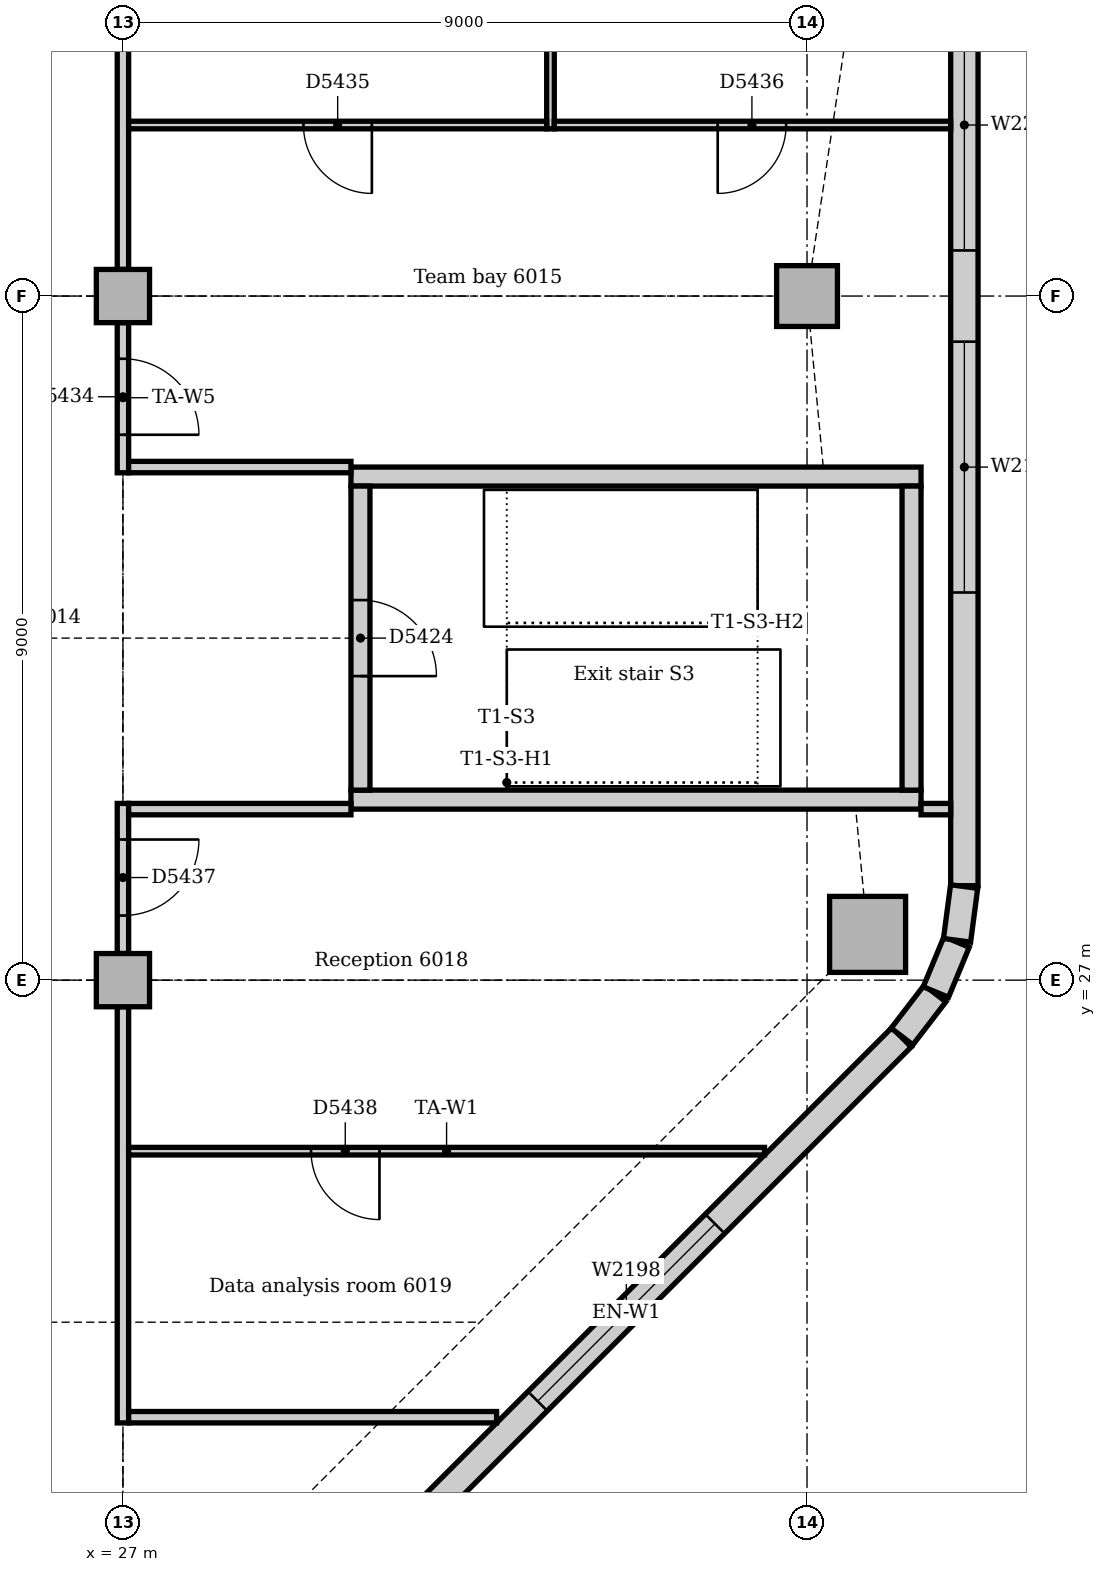
"""IFC4 building model, lengths in metres.
Left out: names, types, materials, properties, quantities, classifications, styles, units other than length and angle.
Written with IfcOpenShell. Run it as: python <this file> out.ifc"""

import sys

from ifc_helpers import new_model, si_unit, direction, frame, frame_2d, origin, origin_2d, place, context, subcontext, project, spatial, rectangle, extrude, element, fill, save


model = new_model("IFC4")
c1 = context("Model", 3, precision=1e-05, world=origin(), true_north=direction((0.0, 1.0)))
c2 = subcontext(c1, "Body", "Model", "MODEL_VIEW")
j1 = project(units=[si_unit("LENGTHUNIT", "METRE"), si_unit("PLANEANGLEUNIT", "RADIAN")], contexts=[c1])
p1 = place(None, origin())
s1 = spatial("IfcSite", under=j1, at=p1, CompositionType="ELEMENT")
p2 = place(p1, origin())
s2 = spatial("IfcBuilding", under=s1, at=p2, CompositionType="ELEMENT")
p3 = place(p2, frame((0.0, 0.0, 251.0)))
s3 = spatial("IfcBuildingStorey", under=s2, at=p3, CompositionType="ELEMENT", Elevation=251.0)
for number, where, z_axis, x_axis in (
    (1, (30.0, 29.375, 0.0), (0.0, 0.0, 1.0), (1.0, 0.0, 0.0)),
    (2, (37.5, 33.625, 0.0), (0.0, 0.0, 1.0), (-1.0, 0.0, 0.0)),
):
    element("IfcWall", number, at=place(p3, frame(where, z_axis=z_axis, x_axis=x_axis)), inside=s3, PredefinedType="SOLIDWALL", context=c2, shape_type="SweptSolid", body=[
        extrude(rectangle(XDim=7.5, YDim=0.25, at=frame_2d((3.75, 0.0))), origin(), (0.0, 0.0, 1.0), 4.0),
    ])
p4 = place(p3, frame((37.375, 29.5, 0.0), z_axis=(0.0, 0.0, 1.0), x_axis=(0.0, 1.0, 0.0)))
e3 = element("IfcWall", 3, at=p4, inside=s3, PredefinedType="SOLIDWALL", context=c2, shape_type="SweptSolid", body=[
    extrude(rectangle(XDim=4.0, YDim=0.25, at=frame_2d((2.0, 0.0))), origin(), (0.0, 0.0, 1.0), 4.0),
])
p5 = place(p3, frame((30.125, 33.5, 0.0), z_axis=(0.0, 0.0, 1.0), x_axis=(0.0, -1.0, 0.0)))
e4 = element("IfcWall", 4, at=p5, inside=s3, PredefinedType="SOLIDWALL", context=c2, shape_type="SweptSolid", body=[
    extrude(rectangle(XDim=4.0, YDim=0.25, at=frame_2d((2.0, 0.0))), origin(), (0.0, 0.0, 1.0), 4.0),
])
p6 = place(p5, frame((1.5, 0.0, 0.0)))
e5 = element("IfcOpeningElement", 5, at=p6, cuts=e4, PredefinedType="OPENING", context=c2, shape_type="SweptSolid", body=[
    extrude(rectangle(XDim=1.0, YDim=2.1, at=frame_2d((0.5, 1.05))), frame((0.0, 0.135, 0.0), z_axis=(0.0, -1.0, 0.0), x_axis=(1.0, 0.0, 0.0)), (0.0, 0.0, 1.0), 0.27),
])
p7 = place(p3, frame((36.797, 27.602, 0.0), z_axis=(0.0, 0.0, 1.0), x_axis=(1.0, 0.0, 0.0)))
e6 = element("IfcColumn", 6, at=p7, inside=s3, PredefinedType="COLUMN", context=c2, shape_type="SweptSolid", body=[
    extrude(rectangle(XDim=1.0, YDim=1.0, at=origin_2d()), origin(), (0.0, 0.0, 1.0), 3.85),
])
p8 = place(p3, frame((36.0, 36.0, 0.0), z_axis=(0.0, 0.0, 1.0), x_axis=(1.0, 0.0, 0.0)))
e7 = element("IfcColumn", 7, at=p8, inside=s3, PredefinedType="COLUMN", context=c2, shape_type="SweptSolid", body=[
    extrude(rectangle(XDim=0.8, YDim=0.8, at=origin_2d()), origin(), (0.0, 0.0, 1.0), 3.85),
])
for number, where, z_axis, x_axis in (
    (8, (27.0, 27.0, 0.0), (0.0, 0.0, 1.0), (1.0, 0.0, 0.0)),
    (9, (27.0, 36.0, 0.0), (0.0, 0.0, 1.0), (1.0, 0.0, 0.0)),
):
    element("IfcColumn", number, at=place(p3, frame(where, z_axis=z_axis, x_axis=x_axis)), inside=s3, PredefinedType="COLUMN", context=c2, shape_type="SweptSolid", body=[
        extrude(rectangle(XDim=0.7, YDim=0.7, at=origin_2d()), origin(), (0.0, 0.0, 1.0), 3.85),
    ])
p9 = place(p3, frame((30.001, 19.006, 0.0), z_axis=(0.0, 0.0, 1.0), x_axis=(0.707106781187, 0.707106781187, 0.0)))
e10 = element("IfcWall", 10, at=p9, inside=s3, PredefinedType="STANDARD", context=c2, shape_type="SweptSolid", body=[
    extrude(rectangle(XDim=10.243, YDim=0.36, at=frame_2d((5.121, 0.0))), origin(), (0.0, 0.0, 1.0), 3.85),
])
p10 = place(p9, frame((3.471, 0.0, 0.9)))
e11 = element("IfcOpeningElement", 11, at=p10, cuts=e10, PredefinedType="OPENING", context=c2, shape_type="SweptSolid", body=[
    extrude(rectangle(XDim=3.3, YDim=1.6, at=frame_2d((1.65, 0.8))), frame((0.0, 0.19, 0.0), z_axis=(0.0, -1.0, 0.0), x_axis=(1.0, 0.0, 0.0)), (0.0, 0.0, 1.0), 0.38),
])
p11 = place(p3, frame((38.07, 28.243, 0.0), z_axis=(0.0, 0.0, 1.0), x_axis=(0.0, 1.0, 0.0)))
e12 = element("IfcWall", 12, at=p11, inside=s3, PredefinedType="STANDARD", context=c2, shape_type="SweptSolid", body=[
    extrude(rectangle(XDim=24.515, YDim=0.36, at=frame_2d((12.257, 0.0))), origin(), (0.0, 0.0, 1.0), 3.85),
])
p12 = place(p11, frame((3.857, 0.0, 0.9)))
e13 = element("IfcOpeningElement", 13, at=p12, cuts=e12, PredefinedType="OPENING", context=c2, shape_type="SweptSolid", body=[
    extrude(rectangle(XDim=3.3, YDim=1.6, at=frame_2d((1.65, 0.8))), frame((0.0, 0.19, 0.0), z_axis=(0.0, -1.0, 0.0), x_axis=(1.0, 0.0, 0.0)), (0.0, 0.0, 1.0), 0.38),
])
p13 = place(p11, frame((8.357, 0.0, 0.9)))
e14 = element("IfcOpeningElement", 14, at=p13, cuts=e12, PredefinedType="OPENING", context=c2, shape_type="SweptSolid", body=[
    extrude(rectangle(XDim=3.3, YDim=1.6, at=frame_2d((1.65, 0.8))), frame((0.0, 0.19, 0.0), z_axis=(0.0, -1.0, 0.0), x_axis=(1.0, 0.0, 0.0)), (0.0, 0.0, 1.0), 0.38),
])
p14 = place(p11, frame((12.857, 0.0, 0.9)))
e15 = element("IfcOpeningElement", 15, at=p14, cuts=e12, PredefinedType="OPENING", context=c2, shape_type="SweptSolid", body=[
    extrude(rectangle(XDim=3.3, YDim=1.6, at=frame_2d((1.65, 0.8))), frame((0.0, 0.19, 0.0), z_axis=(0.0, -1.0, 0.0), x_axis=(1.0, 0.0, 0.0)), (0.0, 0.0, 1.0), 0.38),
])
p15 = place(p11, frame((17.357, 0.0, 0.9)))
e16 = element("IfcOpeningElement", 16, at=p15, cuts=e12, PredefinedType="OPENING", context=c2, shape_type="SweptSolid", body=[
    extrude(rectangle(XDim=3.3, YDim=1.6, at=frame_2d((1.65, 0.8))), frame((0.0, 0.19, 0.0), z_axis=(0.0, -1.0, 0.0), x_axis=(1.0, 0.0, 0.0)), (0.0, 0.0, 1.0), 0.38),
])
p16 = place(p3, frame((37.25, 26.259, 0.0), z_axis=(0.0, 0.0, 1.0), x_axis=(0.608802368033, 0.793321924995, 0.0)))
e17 = element("IfcWall", 17, at=p16, inside=s3, PredefinedType="STANDARD", context=c2, shape_type="SweptSolid", body=[
    extrude(rectangle(XDim=0.713, YDim=0.36, at=frame_2d((0.357, 0.0))), origin(), (0.0, 0.0, 1.0), 3.85),
])
for number, where, z_axis, x_axis in (
    (18, (37.695, 26.844, 0.0), (0.0, 0.0, 1.0), (0.383, 0.924, 0.0)),
    (19, (37.974, 27.524, 0.0), (0.0, 0.0, 1.0), (0.131, 0.991, 0.0)),
):
    element("IfcWall", number, at=place(p3, frame(where, z_axis=z_axis, x_axis=x_axis)), inside=s3, PredefinedType="STANDARD", context=c2, shape_type="SweptSolid", body=[
        extrude(rectangle(XDim=0.713, YDim=0.36, at=frame_2d((0.356, 0.0))), origin(), (0.0, 0.0, 1.0), 3.85),
    ])
p17 = place(p3, frame((27.0, 33.675, 0.0), z_axis=(0.0, 0.0, 1.0), x_axis=(0.0, 1.0, 0.0)))
e20 = element("IfcWall", 20, at=p17, inside=s3, PredefinedType="PARTITIONING", context=c2, shape_type="SweptSolid", body=[
    extrude(rectangle(XDim=1.975, YDim=0.15, at=frame_2d((0.988, 0.0))), origin(), (0.0, 0.0, 1.0), 3.4),
])
p18 = place(p17, frame((0.5, 0.0, 0.0)))
e21 = element("IfcOpeningElement", 21, at=p18, cuts=e20, PredefinedType="OPENING", context=c2, shape_type="SweptSolid", body=[
    extrude(rectangle(XDim=1.0, YDim=2.1, at=frame_2d((0.5, 1.05))), frame((0.0, 0.085, 0.0), z_axis=(0.0, -1.0, 0.0), x_axis=(1.0, 0.0, 0.0)), (0.0, 0.0, 1.0), 0.17),
])
p19 = place(p3, frame((27.0, 36.35, 0.0), z_axis=(0.0, 0.0, 1.0), x_axis=(0.0, 1.0, 0.0)))
e22 = element("IfcWall", 22, at=p19, inside=s3, PredefinedType="PARTITIONING", context=c2, shape_type="SweptSolid", body=[
    extrude(rectangle(XDim=7.4, YDim=0.15, at=frame_2d((3.7, 0.0))), origin(), (0.0, 0.0, 1.0), 3.4),
])
p20 = place(p3, frame((27.0, 21.175, 0.0), z_axis=(0.0, 0.0, 1.0), x_axis=(0.0, 1.0, 0.0)))
e23 = element("IfcWall", 23, at=p20, inside=s3, PredefinedType="PARTITIONING", context=c2, shape_type="SweptSolid", body=[
    extrude(rectangle(XDim=5.475, YDim=0.15, at=frame_2d((2.737, 0.0))), origin(), (0.0, 0.0, 1.0), 3.4),
])
p21 = place(p3, frame((27.0, 27.35, 0.0), z_axis=(0.0, 0.0, 1.0), x_axis=(0.0, 1.0, 0.0)))
e24 = element("IfcWall", 24, at=p21, inside=s3, PredefinedType="PARTITIONING", context=c2, shape_type="SweptSolid", body=[
    extrude(rectangle(XDim=1.975, YDim=0.15, at=frame_2d((0.988, 0.0))), origin(), (0.0, 0.0, 1.0), 3.4),
])
p22 = place(p21, frame((0.5, 0.0, 0.0)))
e25 = element("IfcOpeningElement", 25, at=p22, cuts=e24, PredefinedType="OPENING", context=c2, shape_type="SweptSolid", body=[
    extrude(rectangle(XDim=1.0, YDim=2.1, at=frame_2d((0.5, 1.05))), frame((0.0, 0.085, 0.0), z_axis=(0.0, -1.0, 0.0), x_axis=(1.0, 0.0, 0.0)), (0.0, 0.0, 1.0), 0.17),
])
p23 = place(p3, frame((27.075, 21.25, 0.0), z_axis=(0.0, 0.0, 1.0), x_axis=(1.0, 0.0, 0.0)))
e26 = element("IfcWall", 26, at=p23, inside=s3, PredefinedType="PARTITIONING", context=c2, shape_type="SweptSolid", body=[
    extrude(rectangle(XDim=4.841, YDim=0.15, at=frame_2d((2.421, 0.0))), origin(), (0.0, 0.0, 1.0), 3.85),
])
for number, where, z_axis, x_axis in (
    (27, (27.075, 29.25, 0.0), (0.0, 0.0, 1.0), (1.0, 0.0, 0.0)),
    (28, (27.075, 33.75, 0.0), (0.0, 0.0, 1.0), (1.0, 0.0, 0.0)),
):
    element("IfcWall", number, at=place(p3, frame(where, z_axis=z_axis, x_axis=x_axis)), inside=s3, PredefinedType="PARTITIONING", context=c2, shape_type="SweptSolid", body=[
        extrude(rectangle(XDim=2.925, YDim=0.15, at=frame_2d((1.462, 0.0))), origin(), (0.0, 0.0, 1.0), 3.85),
    ])
p24 = place(p3, frame((37.5, 29.25, 0.0), z_axis=(0.0, 0.0, 1.0), x_axis=(1.0, 0.0, 0.0)))
e29 = element("IfcWall", 29, at=p24, inside=s3, PredefinedType="PARTITIONING", context=c2, shape_type="SweptSolid", body=[
    extrude(rectangle(XDim=0.39, YDim=0.15, at=frame_2d((0.195, 0.0))), origin(), (0.0, 0.0, 1.0), 3.85),
])
p25 = place(p3, frame((32.625, 38.2, 0.0), z_axis=(0.0, 0.0, 1.0), x_axis=(0.0, 1.0, 0.0)))
e30 = element("IfcWall", 30, at=p25, inside=s3, PredefinedType="PARTITIONING", context=c2, shape_type="SweptSolid", body=[
    extrude(rectangle(XDim=20.966, YDim=0.1, at=frame_2d((10.483, 0.0))), origin(), (0.0, 0.0, 1.0), 3.85),
])
p26 = place(p3, frame((27.075, 38.25, 0.0), z_axis=(0.0, 0.0, 1.0), x_axis=(1.0, 0.0, 0.0)))
e31 = element("IfcWall", 31, at=p26, inside=s3, PredefinedType="PARTITIONING", context=c2, shape_type="SweptSolid", body=[
    extrude(rectangle(XDim=5.5, YDim=0.1, at=frame_2d((2.75, 0.0))), origin(), (0.0, 0.0, 1.0), 3.85),
])
p27 = place(p26, frame((2.3, 0.0, 0.0)))
e32 = element("IfcOpeningElement", 32, at=p27, cuts=e31, PredefinedType="OPENING", context=c2, shape_type="SweptSolid", body=[
    extrude(rectangle(XDim=0.9, YDim=2.1, at=frame_2d((0.45, 1.05))), frame((0.0, 0.06, 0.0), z_axis=(0.0, -1.0, 0.0), x_axis=(1.0, 0.0, 0.0)), (0.0, 0.0, 1.0), 0.12),
])
p28 = place(p3, frame((32.675, 38.25, 0.0), z_axis=(0.0, 0.0, 1.0), x_axis=(1.0, 0.0, 0.0)))
e33 = element("IfcWall", 33, at=p28, inside=s3, PredefinedType="PARTITIONING", context=c2, shape_type="SweptSolid", body=[
    extrude(rectangle(XDim=5.215, YDim=0.1, at=frame_2d((2.607, 0.0))), origin(), (0.0, 0.0, 1.0), 3.85),
])
p29 = place(p28, frame((2.15, 0.0, 0.0)))
e34 = element("IfcOpeningElement", 34, at=p29, cuts=e33, PredefinedType="OPENING", context=c2, shape_type="SweptSolid", body=[
    extrude(rectangle(XDim=0.9, YDim=2.1, at=frame_2d((0.45, 1.05))), frame((0.0, 0.06, 0.0), z_axis=(0.0, -1.0, 0.0), x_axis=(1.0, 0.0, 0.0)), (0.0, 0.0, 1.0), 0.12),
])
p30 = place(p3, frame((27.075, 24.75, 0.0), z_axis=(0.0, 0.0, 1.0), x_axis=(1.0, 0.0, 0.0)))
e35 = element("IfcWall", 35, at=p30, inside=s3, PredefinedType="PARTITIONING", context=c2, shape_type="SweptSolid", body=[
    extrude(rectangle(XDim=8.366, YDim=0.1, at=frame_2d((4.183, 0.0))), origin(), (0.0, 0.0, 1.0), 3.85),
])
p31 = place(p30, frame((2.4, 0.0, 0.0)))
e36 = element("IfcOpeningElement", 36, at=p31, cuts=e35, PredefinedType="OPENING", context=c2, shape_type="SweptSolid", body=[
    extrude(rectangle(XDim=0.9, YDim=2.1, at=frame_2d((0.45, 1.05))), frame((0.0, 0.06, 0.0), z_axis=(0.0, -1.0, 0.0), x_axis=(1.0, 0.0, 0.0)), (0.0, 0.0, 1.0), 0.12),
])
p32 = place(p10, origin())
e37 = element("IfcWindow", 37, at=p32, inside=s3, PartitioningType="SINGLE_PANEL", PredefinedType="WINDOW", context=c2, shape_type="SweptSolid", body=[
    extrude(rectangle(XDim=3.3, YDim=1.6, at=frame_2d((1.65, 0.8))), frame((0.0, 0.13, 0.0), z_axis=(0.0, -1.0, 0.0), x_axis=(1.0, 0.0, 0.0)), (0.0, 0.0, 1.0), 0.06),
])
fill(e11, e37)
p33 = place(p12, origin())
e38 = element("IfcWindow", 38, at=p33, inside=s3, PartitioningType="SINGLE_PANEL", PredefinedType="WINDOW", context=c2, shape_type="SweptSolid", body=[
    extrude(rectangle(XDim=3.3, YDim=1.6, at=frame_2d((1.65, 0.8))), frame((0.0, 0.13, 0.0), z_axis=(0.0, -1.0, 0.0), x_axis=(1.0, 0.0, 0.0)), (0.0, 0.0, 1.0), 0.06),
])
fill(e13, e38)
p34 = place(p13, origin())
e39 = element("IfcWindow", 39, at=p34, inside=s3, PartitioningType="SINGLE_PANEL", PredefinedType="WINDOW", context=c2, shape_type="SweptSolid", body=[
    extrude(rectangle(XDim=3.3, YDim=1.6, at=frame_2d((1.65, 0.8))), frame((0.0, 0.13, 0.0), z_axis=(0.0, -1.0, 0.0), x_axis=(1.0, 0.0, 0.0)), (0.0, 0.0, 1.0), 0.06),
])
fill(e14, e39)
p35 = place(p6, origin())
e40 = element("IfcDoor", 40, at=p35, inside=s3, OperationType="SINGLE_SWING_RIGHT", PredefinedType="DOOR", context=c2, shape_type="SweptSolid", body=[
    extrude(rectangle(XDim=1.0, YDim=2.1, at=frame_2d((0.5, 1.05))), frame((0.0, 0.025, 0.0), z_axis=(0.0, -1.0, 0.0), x_axis=(1.0, 0.0, 0.0)), (0.0, 0.0, 1.0), 0.05),
])
fill(e5, e40)
p36 = place(p18, frame((1.0, 0.0, 0.0), z_axis=(0.0, 0.0, 1.0), x_axis=(-1.0, 0.0, 0.0)))
e41 = element("IfcDoor", 41, at=p36, inside=s3, OperationType="SINGLE_SWING_RIGHT", PredefinedType="DOOR", context=c2, shape_type="SweptSolid", body=[
    extrude(rectangle(XDim=1.0, YDim=2.1, at=frame_2d((0.5, 1.05))), frame((0.0, 0.025, 0.0), z_axis=(0.0, -1.0, 0.0), x_axis=(1.0, 0.0, 0.0)), (0.0, 0.0, 1.0), 0.05),
])
fill(e21, e41)
p37 = place(p27, frame((0.9, 0.0, 0.0), z_axis=(0.0, 0.0, 1.0), x_axis=(-1.0, 0.0, 0.0)))
e42 = element("IfcDoor", 42, at=p37, inside=s3, OperationType="SINGLE_SWING_LEFT", PredefinedType="DOOR", context=c2, shape_type="SweptSolid", body=[
    extrude(rectangle(XDim=0.9, YDim=2.1, at=frame_2d((0.45, 1.05))), frame((0.0, 0.025, 0.0), z_axis=(0.0, -1.0, 0.0), x_axis=(1.0, 0.0, 0.0)), (0.0, 0.0, 1.0), 0.05),
])
fill(e32, e42)
p38 = place(p29, frame((0.9, 0.0, 0.0), z_axis=(0.0, 0.0, 1.0), x_axis=(-1.0, 0.0, 0.0)))
e43 = element("IfcDoor", 43, at=p38, inside=s3, OperationType="SINGLE_SWING_RIGHT", PredefinedType="DOOR", context=c2, shape_type="SweptSolid", body=[
    extrude(rectangle(XDim=0.9, YDim=2.1, at=frame_2d((0.45, 1.05))), frame((0.0, 0.025, 0.0), z_axis=(0.0, -1.0, 0.0), x_axis=(1.0, 0.0, 0.0)), (0.0, 0.0, 1.0), 0.05),
])
fill(e34, e43)
p39 = place(p22, frame((1.0, 0.0, 0.0), z_axis=(0.0, 0.0, 1.0), x_axis=(-1.0, 0.0, 0.0)))
e44 = element("IfcDoor", 44, at=p39, inside=s3, OperationType="SINGLE_SWING_LEFT", PredefinedType="DOOR", context=c2, shape_type="SweptSolid", body=[
    extrude(rectangle(XDim=1.0, YDim=2.1, at=frame_2d((0.5, 1.05))), frame((0.0, 0.025, 0.0), z_axis=(0.0, -1.0, 0.0), x_axis=(1.0, 0.0, 0.0)), (0.0, 0.0, 1.0), 0.05),
])
fill(e25, e44)
p40 = place(p31, frame((0.9, 0.0, 0.0), z_axis=(0.0, 0.0, 1.0), x_axis=(-1.0, 0.0, 0.0)))
e45 = element("IfcDoor", 45, at=p40, inside=s3, OperationType="SINGLE_SWING_LEFT", PredefinedType="DOOR", context=c2, shape_type="SweptSolid", body=[
    extrude(rectangle(XDim=0.9, YDim=2.1, at=frame_2d((0.45, 1.05))), frame((0.0, 0.025, 0.0), z_axis=(0.0, -1.0, 0.0), x_axis=(1.0, 0.0, 0.0)), (0.0, 0.0, 1.0), 0.05),
])
fill(e36, e45)
save(model, sys.argv[1])
